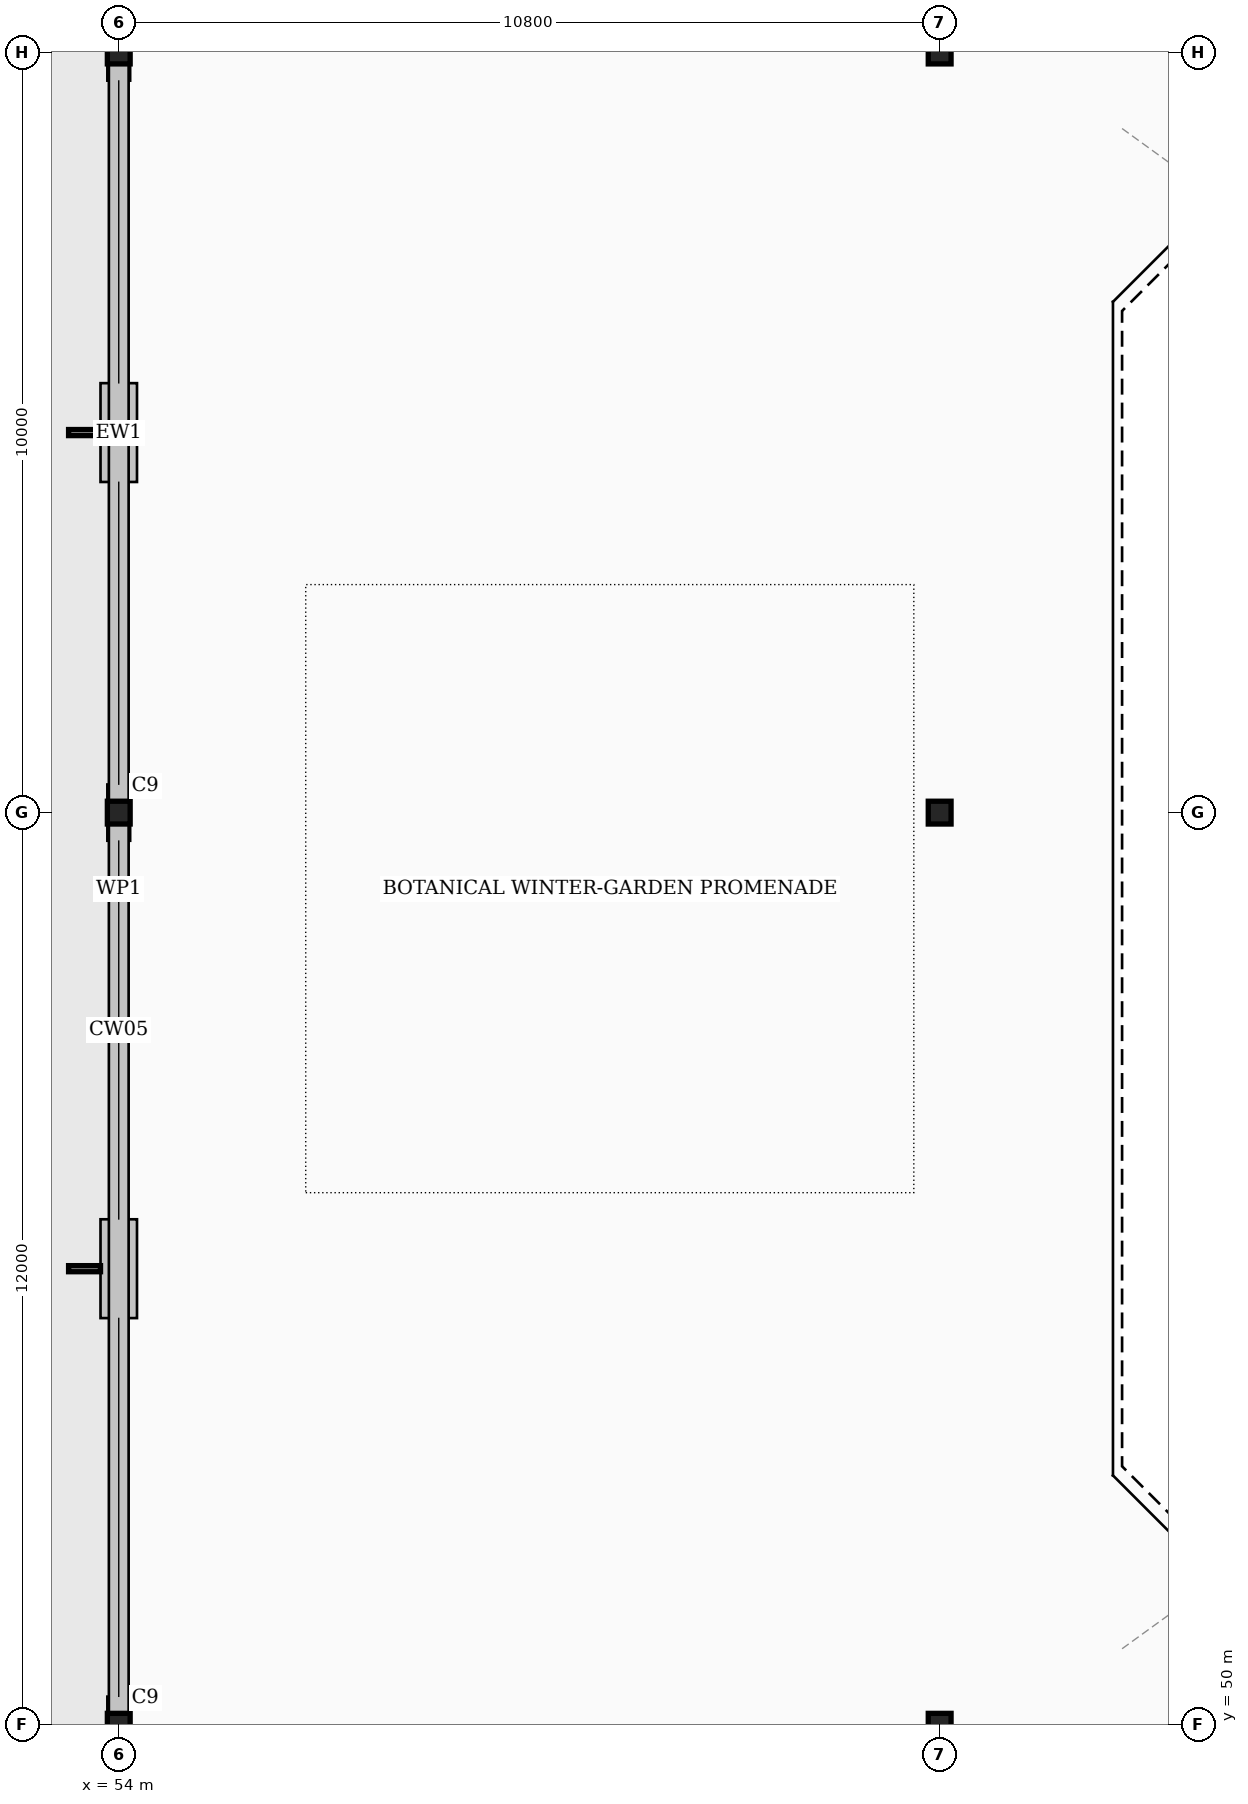
"""IFC4 building model, lengths in metres.
Left out: names, types, materials, properties, quantities, classifications, styles, units other than length and angle.
Written with IfcOpenShell. Run it as: python <this file> out.ifc"""

import sys

from ifc_helpers import new_model, si_unit, direction, frame, frame_2d, origin, origin_2d, place, context, subcontext, project, spatial, rectangle, hollow_rectangle, extrude, element, save


model = new_model("IFC4")
c1 = context("Model", 3, precision=1e-05, world=origin(), true_north=direction((0.0, 1.0)))
c2 = subcontext(c1, "Body", "Model", "MODEL_VIEW")
j1 = project(units=[si_unit("LENGTHUNIT", "METRE"), si_unit("PLANEANGLEUNIT", "RADIAN")], contexts=[c1])
p1 = place(None, origin())
s1 = spatial("IfcSite", under=j1, at=p1, CompositionType="ELEMENT")
p2 = place(p1, origin())
s2 = spatial("IfcBuilding", under=s1, at=p2, CompositionType="ELEMENT")
p3 = place(p2, frame((0.0, 0.0, 24.0)))
s3 = spatial("IfcBuildingStorey", under=s2, at=p3, CompositionType="ELEMENT", Elevation=24.0)
for number, where, z_axis, x_axis in (
    (1, (54.0, 50.0, 0.0), (0.0, 0.0, 1.0), (1.0, 0.0, 0.0)),
    (2, (54.0, 62.0, 0.0), (0.0, 0.0, 1.0), (1.0, 0.0, 0.0)),
    (3, (54.0, 72.0, 0.0), (0.0, 0.0, 1.0), (1.0, 0.0, 0.0)),
    (4, (64.8, 50.0, 0.0), (0.0, 0.0, 1.0), (1.0, 0.0, 0.0)),
    (5, (64.8, 62.0, 0.0), (0.0, 0.0, 1.0), (1.0, 0.0, 0.0)),
    (6, (64.8, 72.0, 0.0), (0.0, 0.0, 1.0), (1.0, 0.0, 0.0)),
):
    element("IfcColumn", number, at=place(p3, frame(where, z_axis=z_axis, x_axis=x_axis)), inside=s3, PredefinedType="COLUMN", context=c2, shape_type="SweptSolid", body=[
        extrude(hollow_rectangle(XDim=0.3, YDim=0.3, WallThickness=0.016, InnerFilletRadius=0.016, OuterFilletRadius=0.032, at=origin_2d()), origin(), (0.0, 0.0, 1.0), 4.8),
    ])
p4 = place(p3, frame((54.0, 67.65, 0.0), z_axis=(0.0, 0.0, 1.0), x_axis=(0.0, -1.0, 0.0)))
e7 = element("IfcWall", 7, at=p4, inside=s3, PredefinedType="STANDARD", context=c2, shape_type="SweptSolid", body=[
    extrude(rectangle(XDim=1.3, YDim=0.48, at=frame_2d((0.65, 0.0))), origin(), (0.0, 0.0, 1.0), 4.109),
])
for number, where, z_axis, x_axis in (
    (8, (54.0, 71.855, 0.0), (0.0, 0.0, 1.0), (0.0, -1.0, 0.0)),
    (9, (54.0, 62.37, 0.0), (0.0, 0.0, 1.0), (0.0, -1.0, 0.0)),
):
    element("IfcWall", number, at=place(p3, frame(where, z_axis=z_axis, x_axis=x_axis)), inside=s3, PredefinedType="STANDARD", context=c2, shape_type="SweptSolid", body=[
        extrude(rectangle(XDim=0.225, YDim=0.3, at=frame_2d((0.113, 0.0))), origin(), (0.0, 0.0, 1.0), 4.56),
    ])
p5 = place(p3, frame((54.0, 56.65, 0.0), z_axis=(0.0, 0.0, 1.0), x_axis=(0.0, -1.0, 0.0)))
e10 = element("IfcWall", 10, at=p5, inside=s3, PredefinedType="STANDARD", context=c2, shape_type="SweptSolid", body=[
    extrude(rectangle(XDim=1.3, YDim=0.48, at=frame_2d((0.65, 0.0))), origin(), (0.0, 0.0, 1.0), 4.109),
])
for number, where, z_axis, x_axis in (
    (11, (54.0, 61.855, 0.0), (0.0, 0.0, 1.0), (0.0, -1.0, 0.0)),
    (12, (54.0, 50.37, 0.0), (0.0, 0.0, 1.0), (0.0, -1.0, 0.0)),
):
    element("IfcWall", number, at=place(p3, frame(where, z_axis=z_axis, x_axis=x_axis)), inside=s3, PredefinedType="STANDARD", context=c2, shape_type="SweptSolid", body=[
        extrude(rectangle(XDim=0.225, YDim=0.3, at=frame_2d((0.113, 0.0))), origin(), (0.0, 0.0, 1.0), 4.56),
    ])
p6 = place(p3, frame((54.0, 40.35, 4.6), z_axis=(0.0, 0.0, 1.0), x_axis=(0.0, 1.0, 0.0)))
e13 = element("IfcWall", 13, at=p6, inside=s3, PredefinedType="PARAPET", context=c2, shape_type="SweptSolid", body=[
    extrude(rectangle(XDim=41.3, YDim=0.26, at=frame_2d((20.65, 0.0))), origin(), (0.0, 0.0, 1.0), 0.55),
])
save(model, sys.argv[1])
